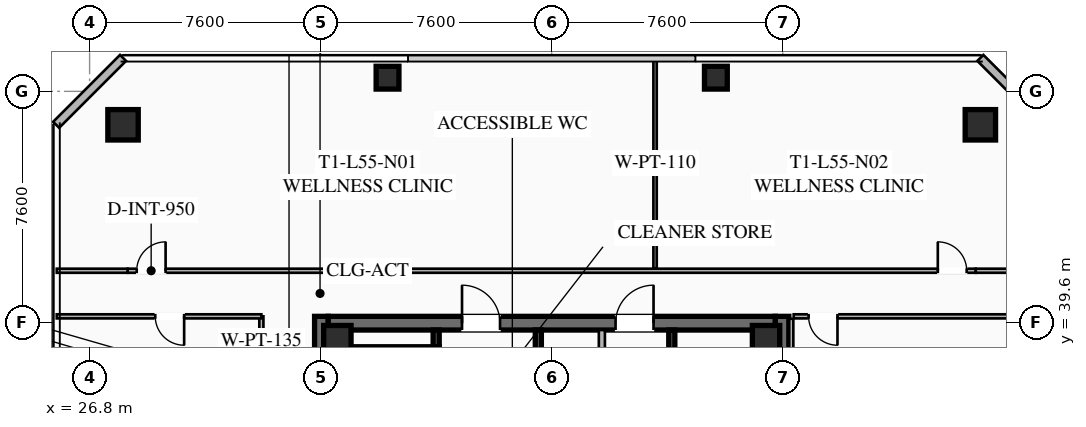
"""IFC4 building model, lengths in metres.
Left out: names, types, materials, properties, quantities, classifications, styles, units other than length and angle.
Written with IfcOpenShell. Run it as: python <this file> out.ifc"""

import sys

from ifc_helpers import new_model, si_unit, direction, frame, frame_2d, origin, origin_2d, place, context, subcontext, project, spatial, rectangle, hollow_rectangle, extrude, element, fill, save


model = new_model("IFC4")
c1 = context("Model", 3, precision=1e-05, world=origin(), true_north=direction((0.0, 1.0)))
c2 = subcontext(c1, "Body", "Model", "MODEL_VIEW")
j1 = project(units=[si_unit("LENGTHUNIT", "METRE"), si_unit("PLANEANGLEUNIT", "RADIAN")], contexts=[c1])
p1 = place(None, origin())
s1 = spatial("IfcSite", under=j1, at=p1, CompositionType="ELEMENT")
p2 = place(p1, origin())
s2 = spatial("IfcBuilding", under=s1, at=p2, CompositionType="ELEMENT")
p3 = place(p2, frame((0.0, 0.0, 204.2)))
s3 = spatial("IfcBuildingStorey", under=s2, at=p3, CompositionType="ELEMENT", Elevation=204.2)
for number, where, z_axis, x_axis in (
    (1, (34.425, 24.2, 0.0), (0.0, 0.0, 1.0), (0.0, 1.0, 0.0)),
    (2, (49.575, 39.8, 0.0), (0.0, 0.0, 1.0), (0.0, -1.0, 0.0)),
):
    element("IfcWall", number, at=place(p3, frame(where, z_axis=z_axis, x_axis=x_axis)), inside=s3, PredefinedType="SHEAR", context=c2, shape_type="SweptSolid", body=[
        extrude(rectangle(XDim=15.6, YDim=0.45, at=frame_2d((7.8, 0.0))), origin(), (0.0, 0.0, 1.0), 3.55),
    ])
p4 = place(p3, frame((34.65, 39.575, 0.0), z_axis=(0.0, 0.0, 1.0), x_axis=(1.0, 0.0, 0.0)))
e3 = element("IfcWall", 3, at=p4, inside=s3, PredefinedType="SHEAR", context=c2, shape_type="SweptSolid", body=[
    extrude(rectangle(XDim=14.7, YDim=0.45, at=frame_2d((7.35, 0.0))), origin(), (0.0, 0.0, 1.0), 3.55),
])
p5 = place(p4, frame((4.4, 0.0, 0.0)))
e4 = element("IfcOpeningElement", 4, at=p5, cuts=e3, PredefinedType="OPENING", context=c2, shape_type="SweptSolid", body=[
    extrude(rectangle(XDim=1.25, YDim=2.25, at=frame_2d((0.625, 1.125))), frame((0.0, 0.235, 0.0), z_axis=(0.0, -1.0, 0.0), x_axis=(1.0, 0.0, 0.0)), (0.0, 0.0, 1.0), 0.47),
])
p6 = place(p4, frame((9.45, 0.0, 0.0)))
e5 = element("IfcOpeningElement", 5, at=p6, cuts=e3, PredefinedType="OPENING", context=c2, shape_type="SweptSolid", body=[
    extrude(rectangle(XDim=1.25, YDim=2.25, at=frame_2d((0.625, 1.125))), frame((0.0, 0.235, 0.0), z_axis=(0.0, -1.0, 0.0), x_axis=(1.0, 0.0, 0.0)), (0.0, 0.0, 1.0), 0.47),
])
for number, where, z_axis, x_axis in (
    (6, (49.05, 39.05, 0.0), (0.0, 0.0, 1.0), (1.0, 0.0, 0.0)),
    (7, (34.95, 39.05, 0.0), (0.0, 0.0, 1.0), (1.0, 0.0, 0.0)),
):
    element("IfcColumn", number, at=place(p3, frame(where, z_axis=z_axis, x_axis=x_axis)), inside=s3, PredefinedType="COLUMN", context=c2, shape_type="SweptSolid", body=[
        extrude(hollow_rectangle(XDim=0.9, YDim=0.9, WallThickness=0.04, at=origin_2d()), origin(), (0.0, 0.0, 1.0), 3.37),
    ])
for number, where, z_axis, x_axis in (
    (8, (56.1, 46.1, 0.0), (0.0, 0.0, 1.0), (1.0, 0.0, 0.0)),
    (9, (27.9, 46.1, 0.0), (0.0, 0.0, 1.0), (1.0, 0.0, 0.0)),
):
    element("IfcColumn", number, at=place(p3, frame(where, z_axis=z_axis, x_axis=x_axis)), inside=s3, PredefinedType="COLUMN", context=c2, shape_type="SweptSolid", body=[
        extrude(hollow_rectangle(XDim=1.0, YDim=1.0, WallThickness=0.04, at=origin_2d()), origin(), (0.0, 0.0, 1.0), 3.37),
    ])
for number, where, z_axis, x_axis in (
    (10, (47.4, 47.65, 0.0), (0.0, 0.0, 1.0), (1.0, 0.0, 0.0)),
    (11, (36.6, 47.65, 0.0), (0.0, 0.0, 1.0), (1.0, 0.0, 0.0)),
):
    element("IfcColumn", number, at=place(p3, frame(where, z_axis=z_axis, x_axis=x_axis)), inside=s3, PredefinedType="COLUMN", context=c2, shape_type="SweptSolid", body=[
        extrude(hollow_rectangle(XDim=0.75, YDim=0.75, WallThickness=0.032, at=origin_2d()), origin(), (0.0, 0.0, 1.0), 3.37),
    ])
for number, where, z_axis, x_axis in (
    (12, (25.7, 46.1, 0.0), (0.0, 0.0, 1.0), (0.707, 0.707, 0.0)),
    (13, (56.1, 48.3, 0.0), (0.0, 0.0, 1.0), (0.707, -0.707, 0.0)),
):
    element("IfcWall", number, at=place(p3, frame(where, z_axis=z_axis, x_axis=x_axis)), inside=s3, PredefinedType="SOLIDWALL", context=c2, shape_type="SweptSolid", body=[
        extrude(rectangle(XDim=3.111, YDim=0.28, at=frame_2d((1.556, 0.0))), origin(), (0.0, 0.0, 1.0), 3.37),
    ])
p7 = place(p3, frame((38.2, 31.2, 0.0), z_axis=(0.0, 0.0, 1.0), x_axis=(0.0, 1.0, 0.0)))
e14 = element("IfcWall", 14, at=p7, inside=s3, PredefinedType="SHEAR", context=c2, shape_type="SweptSolid", body=[
    extrude(rectangle(XDim=8.15, YDim=0.2, at=frame_2d((4.075, 0.0))), origin(), (0.0, 0.0, 1.0), 3.37),
])
p8 = place(p7, frame((0.45, 0.0, 0.0)))
e15 = element("IfcOpeningElement", 15, at=p8, cuts=e14, PredefinedType="OPENING", context=c2, shape_type="SweptSolid", body=[
    extrude(rectangle(XDim=1.15, YDim=2.2, at=frame_2d((0.575, 1.1))), frame((0.0, 0.11, 0.0), z_axis=(0.0, -1.0, 0.0), x_axis=(1.0, 0.0, 0.0)), (0.0, 0.0, 1.0), 0.22),
])
p9 = place(p3, frame((41.56, 24.65, 0.0), z_axis=(0.0, 0.0, 1.0), x_axis=(0.0, 1.0, 0.0)))
e16 = element("IfcWall", 16, at=p9, inside=s3, PredefinedType="SHEAR", context=c2, shape_type="SweptSolid", body=[
    extrude(rectangle(XDim=14.7, YDim=0.2, at=frame_2d((7.35, 0.0))), origin(), (0.0, 0.0, 1.0), 3.37),
])
p10 = place(p3, frame((45.95, 39.35, 0.0), z_axis=(0.0, 0.0, 1.0), x_axis=(0.0, -1.0, 0.0)))
e17 = element("IfcWall", 17, at=p10, inside=s3, PredefinedType="SHEAR", context=c2, shape_type="SweptSolid", body=[
    extrude(rectangle(XDim=6.55, YDim=0.2, at=frame_2d((3.275, 0.0))), origin(), (0.0, 0.0, 1.0), 3.37),
])
p11 = place(p10, frame((5.075, 0.0, 0.0)))
e18 = element("IfcOpeningElement", 18, at=p11, cuts=e17, PredefinedType="OPENING", context=c2, shape_type="SweptSolid", body=[
    extrude(rectangle(XDim=1.1, YDim=2.2, at=frame_2d((0.55, 1.1))), frame((0.0, 0.11, 0.0), z_axis=(0.0, -1.0, 0.0), x_axis=(1.0, 0.0, 0.0)), (0.0, 0.0, 1.0), 0.22),
])
p12 = place(p10, frame((3.025, 0.0, 0.0)))
e19 = element("IfcOpeningElement", 19, at=p12, cuts=e17, PredefinedType="OPENING", context=c2, shape_type="SweptSolid", body=[
    extrude(rectangle(XDim=1.1, YDim=2.2, at=frame_2d((0.55, 1.1))), frame((0.0, 0.11, 0.0), z_axis=(0.0, -1.0, 0.0), x_axis=(1.0, 0.0, 0.0)), (0.0, 0.0, 1.0), 0.22),
])
p13 = place(p10, frame((1.025, 0.0, 0.0)))
e20 = element("IfcOpeningElement", 20, at=p13, cuts=e17, PredefinedType="OPENING", context=c2, shape_type="SweptSolid", body=[
    extrude(rectangle(XDim=1.1, YDim=2.2, at=frame_2d((0.55, 1.1))), frame((0.0, 0.11, 0.0), z_axis=(0.0, -1.0, 0.0), x_axis=(1.0, 0.0, 0.0)), (0.0, 0.0, 1.0), 0.22),
])
p14 = place(p3, frame((43.65, 32.35, 0.0), z_axis=(0.0, 0.0, 1.0), x_axis=(0.0, 1.0, 0.0)))
e21 = element("IfcWall", 21, at=p14, inside=s3, PredefinedType="SOLIDWALL", context=c2, shape_type="SweptSolid", body=[
    extrude(rectangle(XDim=7.0, YDim=0.2, at=frame_2d((3.5, 0.0))), origin(), (0.0, 0.0, 1.0), 2.723),
])
p15 = place(p14, frame((0.85, 0.0, 0.0)))
e22 = element("IfcOpeningElement", 22, at=p15, cuts=e21, PredefinedType="OPENING", context=c2, shape_type="SweptSolid", body=[
    extrude(rectangle(XDim=0.95, YDim=2.05, at=frame_2d((0.475, 1.025))), frame((0.0, 0.11, 0.0), z_axis=(0.0, -1.0, 0.0), x_axis=(1.0, 0.0, 0.0)), (0.0, 0.0, 1.0), 0.22),
])
p16 = place(p14, frame((4.85, 0.0, 0.0)))
e23 = element("IfcOpeningElement", 23, at=p16, cuts=e21, PredefinedType="OPENING", context=c2, shape_type="SweptSolid", body=[
    extrude(rectangle(XDim=0.95, YDim=2.05, at=frame_2d((0.475, 1.025))), frame((0.0, 0.11, 0.0), z_axis=(0.0, -1.0, 0.0), x_axis=(1.0, 0.0, 0.0)), (0.0, 0.0, 1.0), 0.22),
])
p17 = place(p3, frame((32.45, 35.4, 0.0), z_axis=(0.0, 0.0, 1.0), x_axis=(0.0, 1.0, 0.0)))
e24 = element("IfcWall", 24, at=p17, inside=s3, PredefinedType="PARTITIONING", context=c2, shape_type="SweptSolid", body=[
    extrude(rectangle(XDim=4.4, YDim=0.135, at=frame_2d((2.2, 0.0))), origin(), (0.0, 0.0, 1.0), 2.723),
])
p18 = place(p3, frame((28.05, 41.3, 0.0), z_axis=(0.0, 0.0, 1.0), x_axis=(1.0, 0.0, 0.0)))
e25 = element("IfcWall", 25, at=p18, inside=s3, PredefinedType="PARTITIONING", context=c2, shape_type="SweptSolid", body=[
    extrude(rectangle(XDim=27.9, YDim=0.135, at=frame_2d((13.95, 0.0))), origin(), (0.0, 0.0, 1.0), 2.723),
])
p19 = place(p18, frame((0.3, 0.0, 0.0)))
e26 = element("IfcOpeningElement", 26, at=p19, cuts=e25, PredefinedType="OPENING", context=c2, shape_type="SweptSolid", body=[
    extrude(rectangle(XDim=0.95, YDim=2.05, at=frame_2d((0.475, 1.025))), frame((0.0, 0.077, 0.0), z_axis=(0.0, -1.0, 0.0), x_axis=(1.0, 0.0, 0.0)), (0.0, 0.0, 1.0), 0.155),
])
p20 = place(p18, frame((26.65, 0.0, 0.0)))
e27 = element("IfcOpeningElement", 27, at=p20, cuts=e25, PredefinedType="OPENING", context=c2, shape_type="SweptSolid", body=[
    extrude(rectangle(XDim=0.95, YDim=2.05, at=frame_2d((0.475, 1.025))), frame((0.0, 0.077, 0.0), z_axis=(0.0, -1.0, 0.0), x_axis=(1.0, 0.0, 0.0)), (0.0, 0.0, 1.0), 0.155),
])
for number, where, z_axis, x_axis in (
    (28, (25.72, 41.3, 0.0), (0.0, 0.0, 1.0), (1.0, 0.0, 0.0)),
    (29, (55.95, 41.3, 0.0), (0.0, 0.0, 1.0), (1.0, 0.0, 0.0)),
):
    element("IfcWall", number, at=place(p3, frame(where, z_axis=z_axis, x_axis=x_axis)), inside=s3, PredefinedType="PARTITIONING", context=c2, shape_type="SweptSolid", body=[
        extrude(rectangle(XDim=2.33, YDim=0.135, at=frame_2d((1.165, 0.0))), origin(), (0.0, 0.0, 1.0), 2.723),
    ])
p21 = place(p3, frame((45.4, 41.38, 0.0), z_axis=(0.0, 0.0, 1.0), x_axis=(0.0, 1.0, 0.0)))
e30 = element("IfcWall", 30, at=p21, inside=s3, PredefinedType="PARTITIONING", context=c2, shape_type="SweptSolid", body=[
    extrude(rectangle(XDim=6.9, YDim=0.11, at=frame_2d((3.45, 0.0))), origin(), (0.0, 0.0, 1.0), 2.723),
])
p22 = place(p3, frame((49.88, 39.72, 0.0), z_axis=(0.0, 0.0, 1.0), x_axis=(0.0, -1.0, 0.0)))
e31 = element("IfcWall", 31, at=p22, inside=s3, PredefinedType="PARTITIONING", context=c2, shape_type="SweptSolid", body=[
    extrude(rectangle(XDim=15.44, YDim=0.135, at=frame_2d((7.72, 0.0))), origin(), (0.0, 0.0, 1.0), 2.723),
])
p23 = place(p3, frame((58.28, 39.8, 0.0), z_axis=(0.0, 0.0, 1.0), x_axis=(-1.0, 0.0, 0.0)))
e32 = element("IfcWall", 32, at=p23, inside=s3, PredefinedType="PARTITIONING", context=c2, shape_type="SweptSolid", body=[
    extrude(rectangle(XDim=8.32, YDim=0.135, at=frame_2d((4.16, 0.0))), origin(), (0.0, 0.0, 1.0), 2.723),
])
p24 = place(p23, frame((6.88, 0.0, 0.0)))
e33 = element("IfcOpeningElement", 33, at=p24, cuts=e32, PredefinedType="OPENING", context=c2, shape_type="SweptSolid", body=[
    extrude(rectangle(XDim=0.95, YDim=2.05, at=frame_2d((0.475, 1.025))), frame((0.0, 0.077, 0.0), z_axis=(0.0, -1.0, 0.0), x_axis=(1.0, 0.0, 0.0)), (0.0, 0.0, 1.0), 0.155),
])
p25 = place(p3, frame((32.45, 39.8, 0.0), z_axis=(0.0, 0.0, 1.0), x_axis=(-1.0, 0.0, 0.0)))
e34 = element("IfcWall", 34, at=p25, inside=s3, PredefinedType="PARTITIONING", context=c2, shape_type="SweptSolid", body=[
    extrude(rectangle(XDim=6.73, YDim=0.135, at=frame_2d((3.365, 0.0))), origin(), (0.0, 0.0, 1.0), 2.723),
])
p26 = place(p25, frame((2.54, 0.0, 0.0)))
e35 = element("IfcOpeningElement", 35, at=p26, cuts=e34, PredefinedType="OPENING", context=c2, shape_type="SweptSolid", body=[
    extrude(rectangle(XDim=0.95, YDim=2.05, at=frame_2d((0.475, 1.025))), frame((0.0, 0.077, 0.0), z_axis=(0.0, -1.0, 0.0), x_axis=(1.0, 0.0, 0.0)), (0.0, 0.0, 1.0), 0.155),
])
p27 = place(p5, origin())
e36 = element("IfcDoor", 36, at=p27, inside=s3, OperationType="SINGLE_SWING_LEFT", PredefinedType="DOOR", context=c2, shape_type="SweptSolid", body=[
    extrude(rectangle(XDim=1.25, YDim=2.25, at=frame_2d((0.625, 1.125))), frame((0.0, 0.025, 0.0), z_axis=(0.0, -1.0, 0.0), x_axis=(1.0, 0.0, 0.0)), (0.0, 0.0, 1.0), 0.05),
])
fill(e4, e36)
p28 = place(p6, origin())
e37 = element("IfcDoor", 37, at=p28, inside=s3, OperationType="SINGLE_SWING_RIGHT", PredefinedType="DOOR", context=c2, shape_type="SweptSolid", body=[
    extrude(rectangle(XDim=1.25, YDim=2.25, at=frame_2d((0.625, 1.125))), frame((0.0, 0.025, 0.0), z_axis=(0.0, -1.0, 0.0), x_axis=(1.0, 0.0, 0.0)), (0.0, 0.0, 1.0), 0.05),
])
fill(e5, e37)
p29 = place(p19, origin())
e38 = element("IfcDoor", 38, at=p29, inside=s3, OperationType="SINGLE_SWING_RIGHT", PredefinedType="DOOR", context=c2, shape_type="SweptSolid", body=[
    extrude(rectangle(XDim=0.95, YDim=2.05, at=frame_2d((0.475, 1.025))), frame((0.0, 0.025, 0.0), z_axis=(0.0, -1.0, 0.0), x_axis=(1.0, 0.0, 0.0)), (0.0, 0.0, 1.0), 0.05),
])
fill(e26, e38)
p30 = place(p20, origin())
e39 = element("IfcDoor", 39, at=p30, inside=s3, OperationType="SINGLE_SWING_LEFT", PredefinedType="DOOR", context=c2, shape_type="SweptSolid", body=[
    extrude(rectangle(XDim=0.95, YDim=2.05, at=frame_2d((0.475, 1.025))), frame((0.0, 0.025, 0.0), z_axis=(0.0, -1.0, 0.0), x_axis=(1.0, 0.0, 0.0)), (0.0, 0.0, 1.0), 0.05),
])
fill(e27, e39)
p31 = place(p24, origin())
e40 = element("IfcDoor", 40, at=p31, inside=s3, OperationType="SINGLE_SWING_LEFT", PredefinedType="DOOR", context=c2, shape_type="SweptSolid", body=[
    extrude(rectangle(XDim=0.95, YDim=2.05, at=frame_2d((0.475, 1.025))), frame((0.0, 0.025, 0.0), z_axis=(0.0, -1.0, 0.0), x_axis=(1.0, 0.0, 0.0)), (0.0, 0.0, 1.0), 0.05),
])
fill(e33, e40)
p32 = place(p26, origin())
e41 = element("IfcDoor", 41, at=p32, inside=s3, OperationType="SINGLE_SWING_LEFT", PredefinedType="DOOR", context=c2, shape_type="SweptSolid", body=[
    extrude(rectangle(XDim=0.95, YDim=2.05, at=frame_2d((0.475, 1.025))), frame((0.0, 0.025, 0.0), z_axis=(0.0, -1.0, 0.0), x_axis=(1.0, 0.0, 0.0)), (0.0, 0.0, 1.0), 0.05),
])
fill(e35, e41)
save(model, sys.argv[1])
